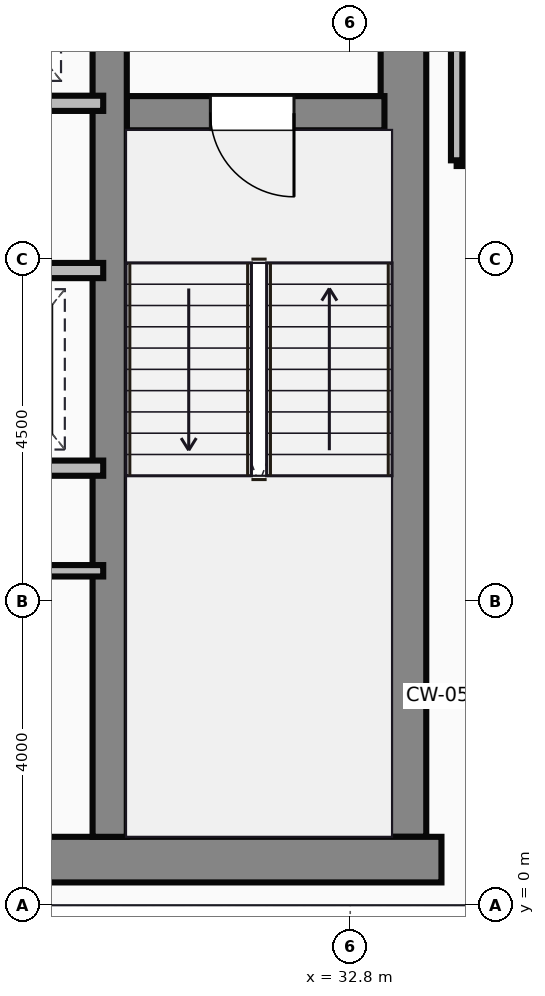
"""IFC4 building model, lengths in metres.
Left out: names, types, materials, properties, quantities, classifications, styles, units other than length and angle.
Written with IfcOpenShell. Run it as: python <this file> out.ifc"""

import sys

from ifc_helpers import new_model, si_unit, direction, frame, frame_2d, origin, place, context, subcontext, project, spatial, rectangle, extrude, source, transform, mapped, element, fill, save


model = new_model("IFC4")
c1 = context("Model", 3, precision=1e-05, world=origin(), true_north=direction((0.0, 1.0)))
c2 = subcontext(c1, "Body", "Model", "MODEL_VIEW")
j1 = project(units=[si_unit("LENGTHUNIT", "METRE"), si_unit("PLANEANGLEUNIT", "RADIAN")], contexts=[c1])
p1 = place(None, origin())
s1 = spatial("IfcSite", under=j1, at=p1, CompositionType="ELEMENT")
p2 = place(p1, origin())
s2 = spatial("IfcBuilding", under=s1, at=p2, CompositionType="ELEMENT")
p3 = place(p2, frame((0.0, 0.0, 199.55)))
s3 = spatial("IfcBuildingStorey", under=s2, at=p3, CompositionType="ELEMENT", Elevation=199.55)
m1 = source(origin(), c2, "Body", "SweptSolid", [
    extrude(rectangle(XDim=29.5, YDim=0.6, at=frame_2d((14.75, 0.0))), origin(), (0.0, 0.0, 1.0), 3.65),
])
p4 = place(p3, frame((4.5, 0.6, 0.0), z_axis=(0.0, 0.0, 1.0), x_axis=(1.0, 0.0, 0.0)))
e1 = element("IfcWall", 1, at=p4, inside=s3, PredefinedType="SHEAR", context=c2, shape_type="MappedRepresentation", body=[
    mapped(m1, transform((0.0, 0.0, 0.0))),
])
m2 = source(origin(), c2, "Body", "SweptSolid", [
    extrude(rectangle(XDim=13.1, YDim=0.6, at=frame_2d((6.55, 0.0))), origin(), (0.0, 0.0, 1.0), 3.65),
])
p5 = place(p3, frame((33.5, 0.9, 0.0), z_axis=(0.0, 0.0, 1.0), x_axis=(0.0, 1.0, 0.0)))
e2 = element("IfcWall", 2, at=p5, inside=s3, PredefinedType="SHEAR", context=c2, shape_type="MappedRepresentation", body=[
    mapped(m2, transform((0.0, 0.0, 0.0))),
])
m3 = source(origin(), c2, "Body", "SweptSolid", [
    extrude(rectangle(XDim=12.5, YDim=0.45, at=frame_2d((6.25, 0.0))), origin(), (0.0, 0.0, 1.0), 3.65),
])
p6 = place(p3, frame((29.635, 0.9, 0.0), z_axis=(0.0, 0.0, 1.0), x_axis=(0.0, 1.0, 0.0)))
e3 = element("IfcWall", 3, at=p6, inside=s3, PredefinedType="SHEAR", context=c2, shape_type="MappedRepresentation", body=[
    mapped(m3, transform((0.0, 0.0, 0.0))),
])
m4 = source(origin(), c2, "Body", "SweptSolid", [
    extrude(rectangle(XDim=3.39, YDim=0.45, at=frame_2d((1.695, 0.0))), origin(), (0.0, 0.0, 1.0), 3.65),
])
p7 = place(p3, frame((29.86, 10.42, 0.0), z_axis=(0.0, 0.0, 1.0), x_axis=(1.0, 0.0, 0.0)))
e4 = element("IfcWall", 4, at=p7, inside=s3, PredefinedType="SHEAR", context=c2, shape_type="MappedRepresentation", body=[
    mapped(m4, transform((0.0, 0.0, 0.0))),
])
p8 = place(p7, frame((1.1, 0.0, 0.0)))
e5 = element("IfcOpeningElement", 5, at=p8, cuts=e4, PredefinedType="OPENING", context=c2, shape_type="SweptSolid", body=[
    extrude(rectangle(XDim=1.1, YDim=2.15, at=frame_2d((0.55, 1.075))), frame((0.0, 0.235, 0.0), z_axis=(0.0, -1.0, 0.0), x_axis=(1.0, 0.0, 0.0)), (0.0, 0.0, 1.0), 0.47),
])
m5 = source(origin(), c2, "Body", "SweptSolid", [
    extrude(rectangle(XDim=8.8, YDim=0.2, at=frame_2d((4.4, 0.0))), origin(), (0.0, 0.0, 1.0), 3.4),
])
p9 = place(p3, frame((20.75, 10.55, 0.0), z_axis=(0.0, 0.0, 1.0), x_axis=(1.0, 0.0, 0.0)))
e6 = element("IfcWall", 6, at=p9, inside=s3, PredefinedType="PARTITIONING", context=c2, shape_type="MappedRepresentation", body=[
    mapped(m5, transform((0.0, 0.0, 0.0))),
])
p10 = place(p9, frame((0.5, 0.0, 0.0)))
e7 = element("IfcOpeningElement", 7, at=p10, cuts=e6, PredefinedType="OPENING", context=c2, shape_type="SweptSolid", body=[
    extrude(rectangle(XDim=1.05, YDim=2.15, at=frame_2d((0.525, 1.075))), frame((0.0, 0.11, 0.0), z_axis=(0.0, -1.0, 0.0), x_axis=(1.0, 0.0, 0.0)), (0.0, 0.0, 1.0), 0.22),
])
p11 = place(p9, frame((2.6, 0.0, 0.0)))
e8 = element("IfcOpeningElement", 8, at=p11, cuts=e6, PredefinedType="OPENING", context=c2, shape_type="SweptSolid", body=[
    extrude(rectangle(XDim=1.05, YDim=2.15, at=frame_2d((0.525, 1.075))), frame((0.0, 0.11, 0.0), z_axis=(0.0, -1.0, 0.0), x_axis=(1.0, 0.0, 0.0)), (0.0, 0.0, 1.0), 0.22),
])
p12 = place(p9, frame((4.7, 0.0, 0.0)))
e9 = element("IfcOpeningElement", 9, at=p12, cuts=e6, PredefinedType="OPENING", context=c2, shape_type="SweptSolid", body=[
    extrude(rectangle(XDim=1.05, YDim=2.15, at=frame_2d((0.525, 1.075))), frame((0.0, 0.11, 0.0), z_axis=(0.0, -1.0, 0.0), x_axis=(1.0, 0.0, 0.0)), (0.0, 0.0, 1.0), 0.22),
])
p13 = place(p9, frame((6.8, 0.0, 0.0)))
e10 = element("IfcOpeningElement", 10, at=p13, cuts=e6, PredefinedType="OPENING", context=c2, shape_type="SweptSolid", body=[
    extrude(rectangle(XDim=1.05, YDim=2.15, at=frame_2d((0.525, 1.075))), frame((0.0, 0.11, 0.0), z_axis=(0.0, -1.0, 0.0), x_axis=(1.0, 0.0, 0.0)), (0.0, 0.0, 1.0), 0.22),
])
m6 = source(origin(), c2, "Body", "SweptSolid", [
    extrude(rectangle(XDim=4.55, YDim=0.2, at=frame_2d((2.275, 0.0))), origin(), (0.0, 0.0, 1.0), 3.4),
])
p14 = place(p3, frame((25.0, 8.35, 0.0), z_axis=(0.0, 0.0, 1.0), x_axis=(1.0, 0.0, 0.0)))
e11 = element("IfcWall", 11, at=p14, inside=s3, PredefinedType="PARTITIONING", context=c2, shape_type="MappedRepresentation", body=[
    mapped(m6, transform((0.0, 0.0, 0.0))),
])
p15 = place(p14, frame((0.5, 0.0, 0.0)))
e12 = element("IfcOpeningElement", 12, at=p15, cuts=e11, PredefinedType="OPENING", context=c2, shape_type="SweptSolid", body=[
    extrude(rectangle(XDim=1.05, YDim=2.15, at=frame_2d((0.525, 1.075))), frame((0.0, 0.11, 0.0), z_axis=(0.0, -1.0, 0.0), x_axis=(1.0, 0.0, 0.0)), (0.0, 0.0, 1.0), 0.22),
])
p16 = place(p14, frame((2.6, 0.0, 0.0)))
e13 = element("IfcOpeningElement", 13, at=p16, cuts=e11, PredefinedType="OPENING", context=c2, shape_type="SweptSolid", body=[
    extrude(rectangle(XDim=1.05, YDim=2.15, at=frame_2d((0.525, 1.075))), frame((0.0, 0.11, 0.0), z_axis=(0.0, -1.0, 0.0), x_axis=(1.0, 0.0, 0.0)), (0.0, 0.0, 1.0), 0.22),
])
p17 = place(p3, frame((25.0, 5.75, 0.0), z_axis=(0.0, 0.0, 1.0), x_axis=(1.0, 0.0, 0.0)))
e14 = element("IfcWall", 14, at=p17, inside=s3, PredefinedType="PARTITIONING", context=c2, shape_type="MappedRepresentation", body=[
    mapped(m6, transform((0.0, 0.0, 0.0))),
])
m7 = source(origin(), c2, "Body", "SweptSolid", [
    extrude(rectangle(XDim=4.55, YDim=0.15, at=frame_2d((2.275, 0.0))), origin(), (0.0, 0.0, 1.0), 3.4),
])
p18 = place(p3, frame((25.0, 4.4, 0.0), z_axis=(0.0, 0.0, 1.0), x_axis=(1.0, 0.0, 0.0)))
e15 = element("IfcWall", 15, at=p18, inside=s3, PredefinedType="PARTITIONING", context=c2, shape_type="MappedRepresentation", body=[
    mapped(m7, transform((0.0, 0.0, 0.0))),
])
m8 = source(origin(), c2, "Body", "SweptSolid", [
    extrude(rectangle(XDim=4.8, YDim=0.15, at=frame_2d((2.4, 0.0))), origin(), (0.0, 0.0, 1.0), 3.4),
])
p19 = place(p3, frame((34.2, 9.8, 0.0), z_axis=(0.0, 0.0, 1.0), x_axis=(1.0, 0.0, 0.0)))
e16 = element("IfcWall", 16, at=p19, inside=s3, PredefinedType="PARTITIONING", context=c2, shape_type="MappedRepresentation", body=[
    mapped(m8, transform((0.0, 0.0, 0.0))),
])
m9 = source(origin(), c2, "Body", "SweptSolid", [
    extrude(rectangle(XDim=4.18, YDim=0.15, at=frame_2d((2.09, 0.0))), origin(), (0.0, 0.0, 1.0), 3.4),
])
p20 = place(p3, frame((34.2, 9.8, 0.0), z_axis=(0.0, 0.0, 1.0), x_axis=(0.0, 1.0, 0.0)))
e17 = element("IfcWall", 17, at=p20, inside=s3, PredefinedType="PARTITIONING", context=c2, shape_type="MappedRepresentation", body=[
    mapped(m9, transform((0.0, 0.0, 0.0))),
])
m10 = source(origin(), c2, "Body", "SweptSolid", [
    extrude(rectangle(XDim=1.1, YDim=2.15, at=frame_2d((0.55, 1.075))), frame((0.0, 0.025, 0.0), z_axis=(0.0, -1.0, 0.0), x_axis=(1.0, 0.0, 0.0)), (0.0, 0.0, 1.0), 0.05),
])
p21 = place(p8, frame((1.1, 0.0, 0.0), z_axis=(0.0, 0.0, 1.0), x_axis=(-1.0, 0.0, 0.0)))
e18 = element("IfcDoor", 18, at=p21, inside=s3, OperationType="SINGLE_SWING_RIGHT", PredefinedType="DOOR", context=c2, shape_type="MappedRepresentation", body=[
    mapped(m10, transform((0.0, 0.0, 0.0))),
])
fill(e5, e18)
save(model, sys.argv[1])
